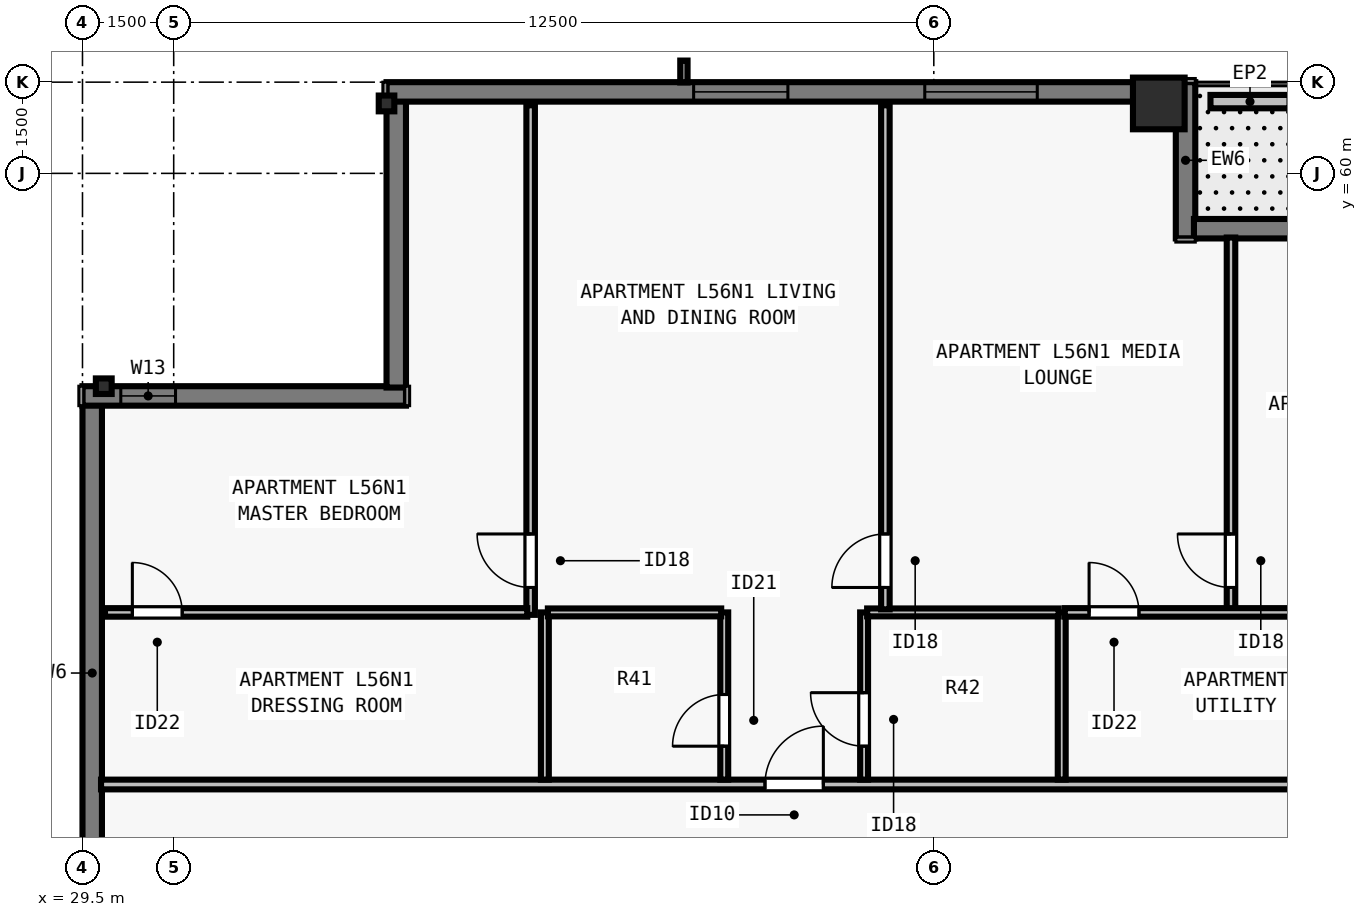
"""IFC4 building model, lengths in metres.
Left out: names, types, materials, properties, quantities, classifications, styles, units other than length and angle.
Written with IfcOpenShell. Run it as: python <this file> out.ifc"""

import sys

from ifc_helpers import new_model, si_unit, direction, frame, frame_2d, origin, origin_2d, place, context, subcontext, project, spatial, rectangle, i_section, extrude, element, fill, save


model = new_model("IFC4")
c1 = context("Model", 3, precision=1e-05, world=origin(), true_north=direction((0.0, 1.0)))
c2 = subcontext(c1, "Body", "Model", "MODEL_VIEW")
j1 = project(units=[si_unit("LENGTHUNIT", "METRE"), si_unit("PLANEANGLEUNIT", "RADIAN")], contexts=[c1])
p1 = place(None, origin())
s1 = spatial("IfcSite", under=j1, at=p1, CompositionType="ELEMENT")
p2 = place(p1, origin())
s2 = spatial("IfcBuilding", under=s1, at=p2, CompositionType="ELEMENT")
p3 = place(p2, frame((0.0, 0.0, 206.0)))
s3 = spatial("IfcBuildingStorey", under=s2, at=p3, CompositionType="ELEMENT", Elevation=206.0)
p4 = place(p3, frame((47.2, 61.15, 0.0), z_axis=(0.0, 0.0, 1.0), x_axis=(1.0, 0.0, 0.0)))
e1 = element("IfcColumn", 1, at=p4, inside=s3, PredefinedType="COLUMN", context=c2, shape_type="SweptSolid", body=[
    extrude(rectangle(XDim=0.85, YDim=0.85, at=origin_2d()), origin(), (0.0, 0.0, 1.0), 3.5),
])
for number, where, z_axis, x_axis in (
    (2, (34.5, 61.15, 0.0), (0.0, 0.0, 1.0), (1.0, 0.0, 0.0)),
    (3, (29.85, 56.5, 0.0), (0.0, 0.0, 1.0), (0.0, 1.0, 0.0)),
):
    element("IfcColumn", number, at=place(p3, frame(where, z_axis=z_axis, x_axis=x_axis)), inside=s3, PredefinedType="COLUMN", context=c2, shape_type="SweptSolid", body=[
        extrude(i_section(OverallWidth=0.256, OverallDepth=0.26, WebThickness=0.01, FlangeThickness=0.017, FilletRadius=0.013, at=origin_2d()), origin(), (0.0, 0.0, 1.0), 3.5),
    ])
p5 = place(p3, frame((29.66, 21.5, 0.0), z_axis=(0.0, 0.0, 1.0), x_axis=(0.0, 1.0, 0.0)))
e4 = element("IfcWall", 4, at=p5, inside=s3, PredefinedType="SOLIDWALL", context=c2, shape_type="SweptSolid", body=[
    extrude(rectangle(XDim=34.702, YDim=0.32, at=frame_2d((17.351, 0.0))), origin(), (0.0, 0.0, 1.0), 3.29),
])
p6 = place(p5, frame((4.312, 0.0, 0.8)))
e5 = element("IfcOpeningElement", 5, at=p6, cuts=e4, PredefinedType="OPENING", context=c2, shape_type="SweptSolid", body=[
    extrude(rectangle(XDim=1.55, YDim=1.678, at=frame_2d((0.775, 0.839))), frame((0.0, 0.17, 0.0), z_axis=(0.0, -1.0, 0.0), x_axis=(1.0, 0.0, 0.0)), (0.0, 0.0, 1.0), 0.34),
])
p7 = place(p5, frame((9.238, 0.0, 0.8)))
e6 = element("IfcOpeningElement", 6, at=p7, cuts=e4, PredefinedType="OPENING", context=c2, shape_type="SweptSolid", body=[
    extrude(rectangle(XDim=1.85, YDim=1.678, at=frame_2d((0.925, 0.839))), frame((0.0, 0.17, 0.0), z_axis=(0.0, -1.0, 0.0), x_axis=(1.0, 0.0, 0.0)), (0.0, 0.0, 1.0), 0.34),
])
p8 = place(p5, frame((14.738, 0.0, 0.8)))
e7 = element("IfcOpeningElement", 7, at=p8, cuts=e4, PredefinedType="OPENING", context=c2, shape_type="SweptSolid", body=[
    extrude(rectangle(XDim=1.85, YDim=1.678, at=frame_2d((0.925, 0.839))), frame((0.0, 0.17, 0.0), z_axis=(0.0, -1.0, 0.0), x_axis=(1.0, 0.0, 0.0)), (0.0, 0.0, 1.0), 0.34),
])
p9 = place(p5, frame((17.014, 0.0, 0.8)))
e8 = element("IfcOpeningElement", 8, at=p9, cuts=e4, PredefinedType="OPENING", context=c2, shape_type="SweptSolid", body=[
    extrude(rectangle(XDim=1.55, YDim=1.678, at=frame_2d((0.775, 0.839))), frame((0.0, 0.17, 0.0), z_axis=(0.0, -1.0, 0.0), x_axis=(1.0, 0.0, 0.0)), (0.0, 0.0, 1.0), 0.34),
])
p10 = place(p5, frame((24.164, 0.0, 0.8)))
e9 = element("IfcOpeningElement", 9, at=p10, cuts=e4, PredefinedType="OPENING", context=c2, shape_type="SweptSolid", body=[
    extrude(rectangle(XDim=1.55, YDim=1.678, at=frame_2d((0.775, 0.839))), frame((0.0, 0.17, 0.0), z_axis=(0.0, -1.0, 0.0), x_axis=(1.0, 0.0, 0.0)), (0.0, 0.0, 1.0), 0.34),
])
p11 = place(p3, frame((29.5, 56.34, 0.0), z_axis=(0.0, 0.0, 1.0), x_axis=(1.0, 0.0, 0.0)))
e10 = element("IfcWall", 10, at=p11, inside=s3, PredefinedType="SOLIDWALL", context=c2, shape_type="SweptSolid", body=[
    extrude(rectangle(XDim=5.32, YDim=0.32, at=frame_2d((2.66, 0.0))), origin(), (0.0, 0.0, 1.0), 3.29),
])
p12 = place(p11, frame((0.63, 0.0, 0.8)))
e11 = element("IfcOpeningElement", 11, at=p12, cuts=e10, PredefinedType="OPENING", context=c2, shape_type="SweptSolid", body=[
    extrude(rectangle(XDim=0.9, YDim=1.678, at=frame_2d((0.45, 0.839))), frame((0.0, 0.17, 0.0), z_axis=(0.0, -1.0, 0.0), x_axis=(1.0, 0.0, 0.0)), (0.0, 0.0, 1.0), 0.34),
])
p13 = place(p3, frame((34.66, 56.478, 0.0), z_axis=(0.0, 0.0, 1.0), x_axis=(0.0, 1.0, 0.0)))
e12 = element("IfcWall", 12, at=p13, inside=s3, PredefinedType="SOLIDWALL", context=c2, shape_type="SweptSolid", body=[
    extrude(rectangle(XDim=4.724, YDim=0.32, at=frame_2d((2.362, 0.0))), origin(), (0.0, 0.0, 1.0), 3.29),
])
p14 = place(p3, frame((34.5, 61.34, 0.0), z_axis=(0.0, 0.0, 1.0), x_axis=(1.0, 0.0, 0.0)))
e13 = element("IfcWall", 13, at=p14, inside=s3, PredefinedType="SOLIDWALL", context=c2, shape_type="SweptSolid", body=[
    extrude(rectangle(XDim=13.002, YDim=0.32, at=frame_2d((6.501, 0.0))), origin(), (0.0, 0.0, 1.0), 3.29),
])
p15 = place(p14, frame((5.051, 0.0, 0.8)))
e14 = element("IfcOpeningElement", 14, at=p15, cuts=e13, PredefinedType="OPENING", context=c2, shape_type="SweptSolid", body=[
    extrude(rectangle(XDim=1.55, YDim=1.678, at=frame_2d((0.775, 0.839))), frame((0.0, 0.17, 0.0), z_axis=(0.0, -1.0, 0.0), x_axis=(1.0, 0.0, 0.0)), (0.0, 0.0, 1.0), 0.34),
])
p16 = place(p14, frame((8.852, 0.0, 0.8)))
e15 = element("IfcOpeningElement", 15, at=p16, cuts=e13, PredefinedType="OPENING", context=c2, shape_type="SweptSolid", body=[
    extrude(rectangle(XDim=1.85, YDim=1.678, at=frame_2d((0.925, 0.839))), frame((0.0, 0.17, 0.0), z_axis=(0.0, -1.0, 0.0), x_axis=(1.0, 0.0, 0.0)), (0.0, 0.0, 1.0), 0.34),
])
p17 = place(p3, frame((47.64, 61.5, 0.0), z_axis=(0.0, 0.0, 1.0), x_axis=(0.0, -1.0, 0.0)))
e16 = element("IfcWall", 16, at=p17, inside=s3, PredefinedType="SOLIDWALL", context=c2, shape_type="SweptSolid", body=[
    extrude(rectangle(XDim=2.57, YDim=0.32, at=frame_2d((1.285, 0.0))), origin(), (0.0, 0.0, 1.0), 3.29),
])
p18 = place(p3, frame((47.778, 59.09, 0.0), z_axis=(0.0, 0.0, 1.0), x_axis=(1.0, 0.0, 0.0)))
e17 = element("IfcWall", 17, at=p18, inside=s3, PredefinedType="SOLIDWALL", context=c2, shape_type="SweptSolid", body=[
    extrude(rectangle(XDim=7.142, YDim=0.32, at=frame_2d((3.571, 0.0))), origin(), (0.0, 0.0, 1.0), 3.29),
])
p19 = place(p18, frame((2.18, 0.0, 0.0)))
e18 = element("IfcOpeningElement", 18, at=p19, cuts=e17, PredefinedType="OPENING", context=c2, shape_type="SweptSolid", body=[
    extrude(rectangle(XDim=1.0, YDim=2.15, at=frame_2d((0.5, 1.075))), frame((0.0, 0.17, 0.0), z_axis=(0.0, -1.0, 0.0), x_axis=(1.0, 0.0, 0.0)), (0.0, 0.0, 1.0), 0.34),
])
p20 = place(p3, frame((48.05, 61.18, 0.0), z_axis=(0.0, 0.0, 1.0), x_axis=(1.0, 0.0, 0.0)))
e19 = element("IfcWall", 19, at=p20, inside=s3, PredefinedType="PARAPET", context=c2, shape_type="SweptSolid", body=[
    extrude(rectangle(XDim=1.3, YDim=0.22, at=frame_2d((0.65, 0.0))), origin(), (0.0, 0.0, 1.0), 0.55),
])
p21 = place(p3, frame((29.805, 49.95, 0.0), z_axis=(0.0, 0.0, 1.0), x_axis=(1.0, 0.0, 0.0)))
e20 = element("IfcWall", 20, at=p21, inside=s3, PredefinedType="PARTITIONING", context=c2, shape_type="SweptSolid", body=[
    extrude(rectangle(XDim=44.39, YDim=0.16, at=frame_2d((22.195, 0.0))), origin(), (0.0, 0.0, 1.0), 2.958),
])
p22 = place(p21, frame((10.919, 0.0, 0.0)))
e21 = element("IfcOpeningElement", 21, at=p22, cuts=e20, PredefinedType="OPENING", context=c2, shape_type="SweptSolid", body=[
    extrude(rectangle(XDim=0.96, YDim=2.18, at=frame_2d((0.48, 1.09))), frame((0.0, 0.09, 0.0), z_axis=(0.0, -1.0, 0.0), x_axis=(1.0, 0.0, 0.0)), (0.0, 0.0, 1.0), 0.18),
])
p23 = place(p21, frame((32.999, 0.0, 0.0)))
e22 = element("IfcOpeningElement", 22, at=p23, cuts=e20, PredefinedType="OPENING", context=c2, shape_type="SweptSolid", body=[
    extrude(rectangle(XDim=0.96, YDim=2.18, at=frame_2d((0.48, 1.09))), frame((0.0, 0.09, 0.0), z_axis=(0.0, -1.0, 0.0), x_axis=(1.0, 0.0, 0.0)), (0.0, 0.0, 1.0), 0.18),
])
p24 = place(p3, frame((37.104, 50.03, 0.0), z_axis=(0.0, 0.0, 1.0), x_axis=(0.0, 1.0, 0.0)))
e23 = element("IfcWall", 23, at=p24, inside=s3, PredefinedType="PLUMBINGWALL", context=c2, shape_type="SweptSolid", body=[
    extrude(rectangle(XDim=2.75, YDim=0.13, at=frame_2d((1.375, 0.0))), origin(), (0.0, 0.0, 1.0), 3.29),
])
p25 = place(p3, frame((40.054, 50.03, 0.0), z_axis=(0.0, 0.0, 1.0), x_axis=(0.0, 1.0, 0.0)))
e24 = element("IfcWall", 24, at=p25, inside=s3, PredefinedType="PLUMBINGWALL", context=c2, shape_type="SweptSolid", body=[
    extrude(rectangle(XDim=2.75, YDim=0.13, at=frame_2d((1.375, 0.0))), origin(), (0.0, 0.0, 1.0), 2.573),
])
p26 = place(p25, frame((0.55, 0.0, 0.0)))
e25 = element("IfcOpeningElement", 25, at=p26, cuts=e24, PredefinedType="OPENING", context=c2, shape_type="SweptSolid", body=[
    extrude(rectangle(XDim=0.85, YDim=2.08, at=frame_2d((0.425, 1.04))), frame((0.0, 0.075, 0.0), z_axis=(0.0, -1.0, 0.0), x_axis=(1.0, 0.0, 0.0)), (0.0, 0.0, 1.0), 0.15),
])
p27 = place(p3, frame((37.154, 52.78, 0.0), z_axis=(0.0, 0.0, 1.0), x_axis=(1.0, 0.0, 0.0)))
e26 = element("IfcWall", 26, at=p27, inside=s3, PredefinedType="PLUMBINGWALL", context=c2, shape_type="SweptSolid", body=[
    extrude(rectangle(XDim=2.85, YDim=0.13, at=frame_2d((1.425, 0.0))), origin(), (0.0, 0.0, 1.0), 3.29),
])
p28 = place(p3, frame((45.604, 50.03, 0.0), z_axis=(0.0, 0.0, 1.0), x_axis=(0.0, 1.0, 0.0)))
e27 = element("IfcWall", 27, at=p28, inside=s3, PredefinedType="PLUMBINGWALL", context=c2, shape_type="SweptSolid", body=[
    extrude(rectangle(XDim=2.75, YDim=0.13, at=frame_2d((1.375, 0.0))), origin(), (0.0, 0.0, 1.0), 3.29),
])
p29 = place(p3, frame((42.354, 50.03, 0.0), z_axis=(0.0, 0.0, 1.0), x_axis=(0.0, 1.0, 0.0)))
e28 = element("IfcWall", 28, at=p29, inside=s3, PredefinedType="PLUMBINGWALL", context=c2, shape_type="SweptSolid", body=[
    extrude(rectangle(XDim=2.75, YDim=0.13, at=frame_2d((1.375, 0.0))), origin(), (0.0, 0.0, 1.0), 3.29),
])
p30 = place(p29, frame((0.55, 0.0, 0.0)))
e29 = element("IfcOpeningElement", 29, at=p30, cuts=e28, PredefinedType="OPENING", context=c2, shape_type="SweptSolid", body=[
    extrude(rectangle(XDim=0.88, YDim=2.1, at=frame_2d((0.44, 1.05))), frame((0.0, 0.075, 0.0), z_axis=(0.0, -1.0, 0.0), x_axis=(1.0, 0.0, 0.0)), (0.0, 0.0, 1.0), 0.15),
])
p31 = place(p3, frame((42.404, 52.78, 0.0), z_axis=(0.0, 0.0, 1.0), x_axis=(1.0, 0.0, 0.0)))
e30 = element("IfcWall", 30, at=p31, inside=s3, PredefinedType="PLUMBINGWALL", context=c2, shape_type="SweptSolid", body=[
    extrude(rectangle(XDim=3.15, YDim=0.13, at=frame_2d((1.575, 0.0))), origin(), (0.0, 0.0, 1.0), 3.29),
])
p32 = place(p3, frame((36.87, 52.74, 0.0), z_axis=(0.0, 0.0, 1.0), x_axis=(0.0, 1.0, 0.0)))
e31 = element("IfcWall", 31, at=p32, inside=s3, PredefinedType="PARTITIONING", context=c2, shape_type="SweptSolid", body=[
    extrude(rectangle(XDim=8.38, YDim=0.14, at=frame_2d((4.19, 0.0))), origin(), (0.0, 0.0, 1.0), 2.573),
])
p33 = place(p32, frame((0.45, 0.0, 0.0)))
e32 = element("IfcOpeningElement", 32, at=p33, cuts=e31, PredefinedType="OPENING", context=c2, shape_type="SweptSolid", body=[
    extrude(rectangle(XDim=0.88, YDim=2.1, at=frame_2d((0.44, 1.05))), frame((0.0, 0.08, 0.0), z_axis=(0.0, -1.0, 0.0), x_axis=(1.0, 0.0, 0.0)), (0.0, 0.0, 1.0), 0.16),
])
p34 = place(p3, frame((29.87, 52.78, 0.0), z_axis=(0.0, 0.0, 1.0), x_axis=(1.0, 0.0, 0.0)))
e33 = element("IfcWall", 33, at=p34, inside=s3, PredefinedType="PARTITIONING", context=c2, shape_type="SweptSolid", body=[
    extrude(rectangle(XDim=6.945, YDim=0.14, at=frame_2d((3.472, 0.0))), origin(), (0.0, 0.0, 1.0), 2.958),
])
p35 = place(p34, frame((0.45, 0.0, 0.0)))
e34 = element("IfcOpeningElement", 34, at=p35, cuts=e33, PredefinedType="OPENING", context=c2, shape_type="SweptSolid", body=[
    extrude(rectangle(XDim=0.82, YDim=2.1, at=frame_2d((0.41, 1.05))), frame((0.0, 0.08, 0.0), z_axis=(0.0, -1.0, 0.0), x_axis=(1.0, 0.0, 0.0)), (0.0, 0.0, 1.0), 0.16),
])
p36 = place(p3, frame((48.387, 52.74, 0.0), z_axis=(0.0, 0.0, 1.0), x_axis=(0.0, 1.0, 0.0)))
e35 = element("IfcWall", 35, at=p36, inside=s3, PredefinedType="PARTITIONING", context=c2, shape_type="SweptSolid", body=[
    extrude(rectangle(XDim=6.205, YDim=0.14, at=frame_2d((3.103, 0.0))), origin(), (0.0, 0.0, 1.0), 3.29),
])
p37 = place(p36, frame((0.45, 0.0, 0.0)))
e36 = element("IfcOpeningElement", 36, at=p37, cuts=e35, PredefinedType="OPENING", context=c2, shape_type="SweptSolid", body=[
    extrude(rectangle(XDim=0.88, YDim=2.1, at=frame_2d((0.44, 1.05))), frame((0.0, 0.08, 0.0), z_axis=(0.0, -1.0, 0.0), x_axis=(1.0, 0.0, 0.0)), (0.0, 0.0, 1.0), 0.16),
])
p38 = place(p3, frame((45.654, 52.78, 0.0), z_axis=(0.0, 0.0, 1.0), x_axis=(1.0, 0.0, 0.0)))
e37 = element("IfcWall", 37, at=p38, inside=s3, PredefinedType="PARTITIONING", context=c2, shape_type="SweptSolid", body=[
    extrude(rectangle(XDim=6.884, YDim=0.14, at=frame_2d((3.442, 0.0))), origin(), (0.0, 0.0, 1.0), 3.29),
])
p39 = place(p38, frame((0.4, 0.0, 0.0)))
e38 = element("IfcOpeningElement", 38, at=p39, cuts=e37, PredefinedType="OPENING", context=c2, shape_type="SweptSolid", body=[
    extrude(rectangle(XDim=0.82, YDim=2.1, at=frame_2d((0.41, 1.05))), frame((0.0, 0.08, 0.0), z_axis=(0.0, -1.0, 0.0), x_axis=(1.0, 0.0, 0.0)), (0.0, 0.0, 1.0), 0.16),
])
p40 = place(p3, frame((42.704, 52.83, 0.0), z_axis=(0.0, 0.0, 1.0), x_axis=(0.0, 1.0, 0.0)))
e39 = element("IfcWall", 39, at=p40, inside=s3, PredefinedType="PARTITIONING", context=c2, shape_type="SweptSolid", body=[
    extrude(rectangle(XDim=8.29, YDim=0.14, at=frame_2d((4.145, 0.0))), origin(), (0.0, 0.0, 1.0), 3.29),
])
p41 = place(p40, frame((0.36, 0.0, 0.0)))
e40 = element("IfcOpeningElement", 40, at=p41, cuts=e39, PredefinedType="OPENING", context=c2, shape_type="SweptSolid", body=[
    extrude(rectangle(XDim=0.88, YDim=2.1, at=frame_2d((0.44, 1.05))), frame((0.0, 0.08, 0.0), z_axis=(0.0, -1.0, 0.0), x_axis=(1.0, 0.0, 0.0)), (0.0, 0.0, 1.0), 0.16),
])
p42 = place(p15, origin())
e41 = element("IfcWindow", 41, at=p42, inside=s3, PartitioningType="SINGLE_PANEL", PredefinedType="WINDOW", context=c2, shape_type="SweptSolid", body=[
    extrude(rectangle(XDim=1.55, YDim=1.678, at=frame_2d((0.775, 0.839))), frame((0.0, -0.05, 0.0), z_axis=(0.0, -1.0, 0.0), x_axis=(1.0, 0.0, 0.0)), (0.0, 0.0, 1.0), 0.06),
])
fill(e14, e41)
p43 = place(p16, origin())
e42 = element("IfcWindow", 42, at=p43, inside=s3, PartitioningType="SINGLE_PANEL", PredefinedType="WINDOW", context=c2, shape_type="SweptSolid", body=[
    extrude(rectangle(XDim=1.85, YDim=1.678, at=frame_2d((0.925, 0.839))), frame((0.0, -0.05, 0.0), z_axis=(0.0, -1.0, 0.0), x_axis=(1.0, 0.0, 0.0)), (0.0, 0.0, 1.0), 0.06),
])
fill(e15, e42)
p44 = place(p12, origin())
e43 = element("IfcWindow", 43, at=p44, inside=s3, PartitioningType="SINGLE_PANEL", PredefinedType="WINDOW", context=c2, shape_type="SweptSolid", body=[
    extrude(rectangle(XDim=0.9, YDim=1.678, at=frame_2d((0.45, 0.839))), frame((0.0, -0.04, 0.0), z_axis=(0.0, -1.0, 0.0), x_axis=(1.0, 0.0, 0.0)), (0.0, 0.0, 1.0), 0.06),
])
fill(e11, e43)
p45 = place(p26, origin())
e44 = element("IfcDoor", 44, at=p45, inside=s3, OperationType="SINGLE_SWING_LEFT", PredefinedType="DOOR", context=c2, shape_type="SweptSolid", body=[
    extrude(rectangle(XDim=0.85, YDim=2.08, at=frame_2d((0.425, 1.04))), frame((0.0, 0.025, 0.0), z_axis=(0.0, -1.0, 0.0), x_axis=(1.0, 0.0, 0.0)), (0.0, 0.0, 1.0), 0.05),
])
fill(e25, e44)
p46 = place(p30, origin())
e45 = element("IfcDoor", 45, at=p46, inside=s3, OperationType="SINGLE_SWING_RIGHT", PredefinedType="DOOR", context=c2, shape_type="SweptSolid", body=[
    extrude(rectangle(XDim=0.88, YDim=2.1, at=frame_2d((0.44, 1.05))), frame((0.0, 0.025, 0.0), z_axis=(0.0, -1.0, 0.0), x_axis=(1.0, 0.0, 0.0)), (0.0, 0.0, 1.0), 0.05),
])
fill(e29, e45)
p47 = place(p35, origin())
e46 = element("IfcDoor", 46, at=p47, inside=s3, OperationType="SINGLE_SWING_LEFT", PredefinedType="DOOR", context=c2, shape_type="SweptSolid", body=[
    extrude(rectangle(XDim=0.82, YDim=2.1, at=frame_2d((0.41, 1.05))), frame((0.0, 0.025, 0.0), z_axis=(0.0, -1.0, 0.0), x_axis=(1.0, 0.0, 0.0)), (0.0, 0.0, 1.0), 0.05),
])
fill(e34, e46)
p48 = place(p33, origin())
e47 = element("IfcDoor", 47, at=p48, inside=s3, OperationType="SINGLE_SWING_RIGHT", PredefinedType="DOOR", context=c2, shape_type="SweptSolid", body=[
    extrude(rectangle(XDim=0.88, YDim=2.1, at=frame_2d((0.44, 1.05))), frame((0.0, 0.025, 0.0), z_axis=(0.0, -1.0, 0.0), x_axis=(1.0, 0.0, 0.0)), (0.0, 0.0, 1.0), 0.05),
])
fill(e32, e47)
p49 = place(p39, origin())
e48 = element("IfcDoor", 48, at=p49, inside=s3, OperationType="SINGLE_SWING_LEFT", PredefinedType="DOOR", context=c2, shape_type="SweptSolid", body=[
    extrude(rectangle(XDim=0.82, YDim=2.1, at=frame_2d((0.41, 1.05))), frame((0.0, 0.025, 0.0), z_axis=(0.0, -1.0, 0.0), x_axis=(1.0, 0.0, 0.0)), (0.0, 0.0, 1.0), 0.05),
])
fill(e38, e48)
p50 = place(p37, origin())
e49 = element("IfcDoor", 49, at=p50, inside=s3, OperationType="SINGLE_SWING_RIGHT", PredefinedType="DOOR", context=c2, shape_type="SweptSolid", body=[
    extrude(rectangle(XDim=0.88, YDim=2.1, at=frame_2d((0.44, 1.05))), frame((0.0, 0.025, 0.0), z_axis=(0.0, -1.0, 0.0), x_axis=(1.0, 0.0, 0.0)), (0.0, 0.0, 1.0), 0.05),
])
fill(e36, e49)
p51 = place(p41, origin())
e50 = element("IfcDoor", 50, at=p51, inside=s3, OperationType="SINGLE_SWING_LEFT", PredefinedType="DOOR", context=c2, shape_type="SweptSolid", body=[
    extrude(rectangle(XDim=0.88, YDim=2.1, at=frame_2d((0.44, 1.05))), frame((0.0, 0.025, 0.0), z_axis=(0.0, -1.0, 0.0), x_axis=(1.0, 0.0, 0.0)), (0.0, 0.0, 1.0), 0.05),
])
fill(e40, e50)
p52 = place(p22, origin())
e51 = element("IfcDoor", 51, at=p52, inside=s3, OperationType="SINGLE_SWING_RIGHT", PredefinedType="DOOR", context=c2, shape_type="SweptSolid", body=[
    extrude(rectangle(XDim=0.96, YDim=2.18, at=frame_2d((0.48, 1.09))), frame((0.0, 0.025, 0.0), z_axis=(0.0, -1.0, 0.0), x_axis=(1.0, 0.0, 0.0)), (0.0, 0.0, 1.0), 0.05),
])
fill(e21, e51)
save(model, sys.argv[1])
